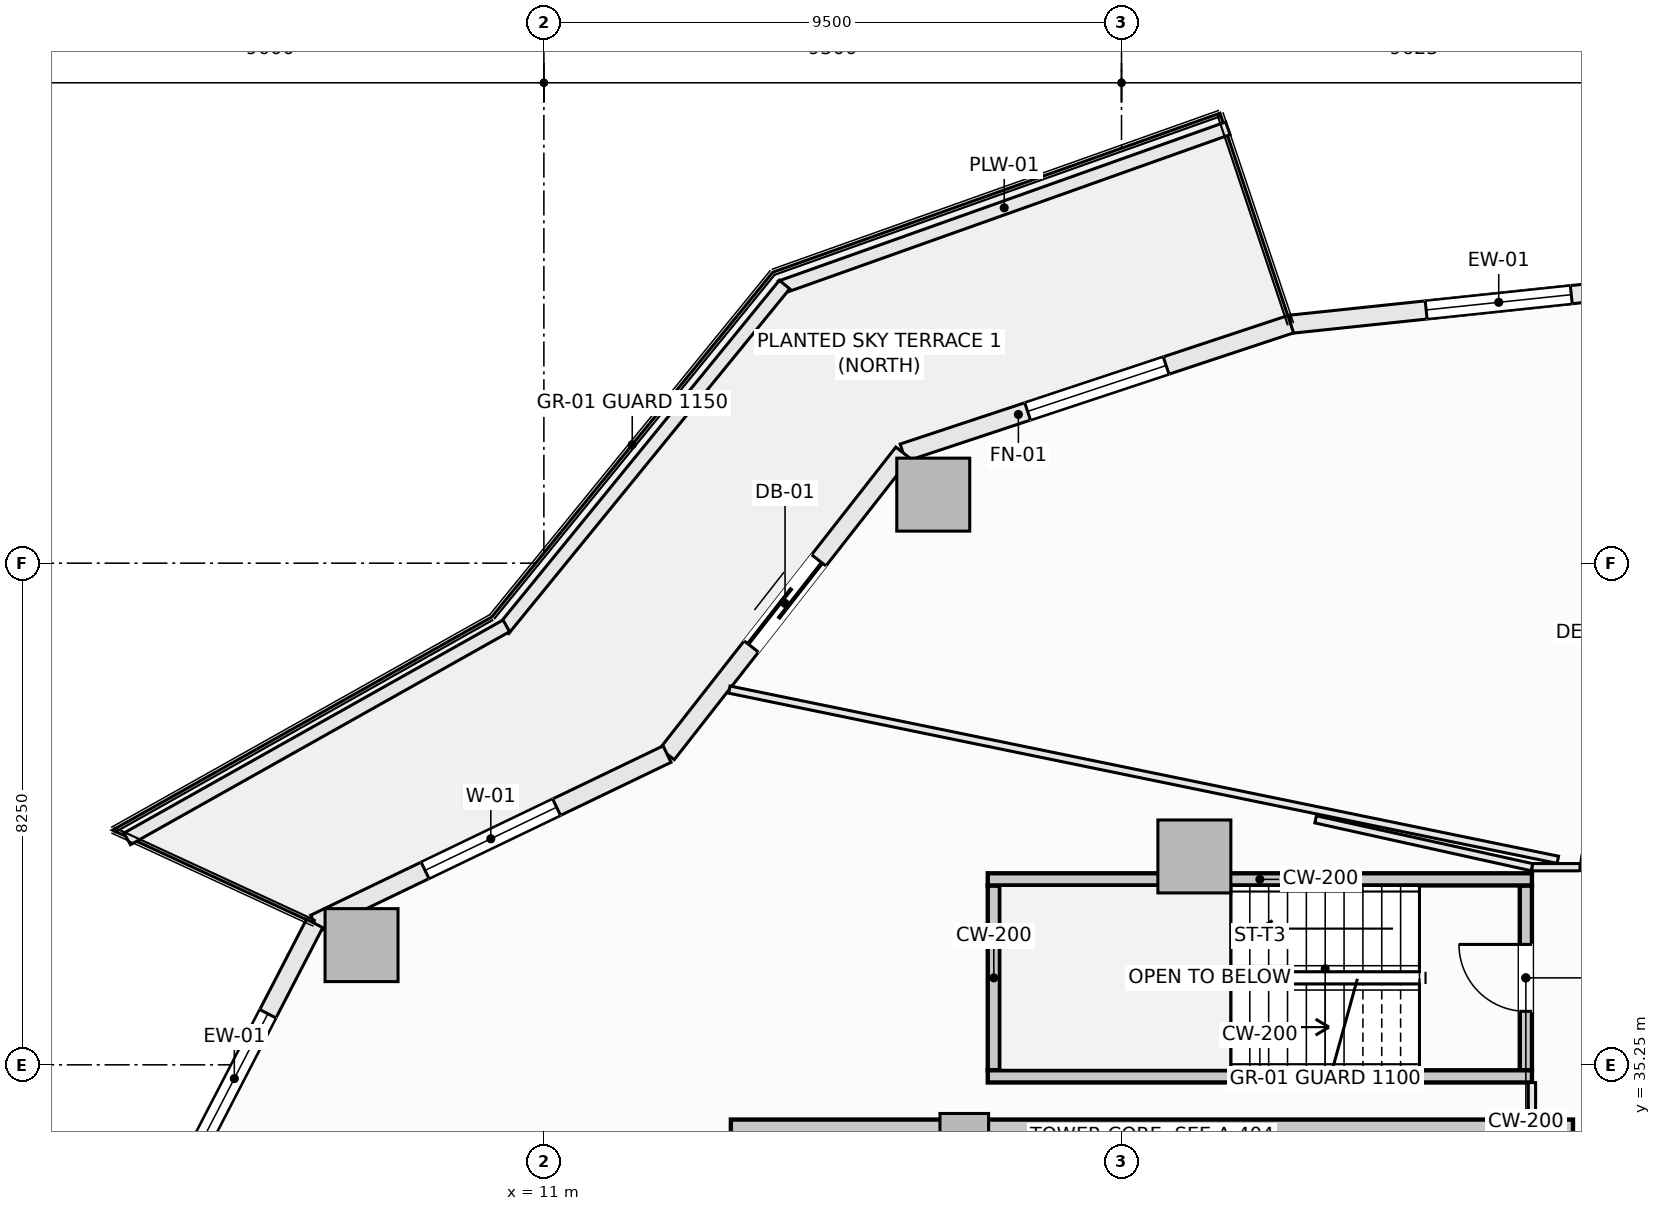
"""IFC4 building model, lengths in metres.
Left out: names, types, materials, properties, quantities, classifications, styles, units other than length and angle.
Written with IfcOpenShell. Run it as: python <this file> out.ifc"""

import sys

from ifc_helpers import new_model, si_unit, direction, frame, frame_2d, origin, origin_2d, place, context, subcontext, project, spatial, rectangle, extrude, element, fill, save


model = new_model("IFC4")
c1 = context("Model", 3, precision=1e-05, world=origin(), true_north=direction((0.0, 1.0)))
c2 = subcontext(c1, "Body", "Model", "MODEL_VIEW")
j1 = project(units=[si_unit("LENGTHUNIT", "METRE"), si_unit("PLANEANGLEUNIT", "RADIAN")], contexts=[c1])
p1 = place(None, origin())
s1 = spatial("IfcSite", under=j1, at=p1, CompositionType="ELEMENT")
p2 = place(p1, origin())
s2 = spatial("IfcBuilding", under=s1, at=p2, CompositionType="ELEMENT")
p3 = place(p2, frame((0.0, 0.0, 61.15)))
s3 = spatial("IfcBuildingStorey", under=s2, at=p3, CompositionType="ELEMENT", Elevation=61.15)
p4 = place(p3, frame((14.075, 33.925, -0.28), z_axis=(0.0, 0.0, 1.0), x_axis=(1.0, 0.0, 0.0)))
e1 = element("IfcWall", 1, at=p4, inside=s3, PredefinedType="SHEAR", context=c2, shape_type="SweptSolid", body=[
    extrude(rectangle(XDim=13.85, YDim=0.85, at=frame_2d((6.925, 0.0))), origin(), (0.0, 0.0, 1.0), 3.85),
])
for number, where, z_axis, x_axis in (
    (2, (17.404, 44.627, -0.28), (0.0, 0.0, 1.0), (1.0, 0.0, 0.0)),
    (3, (8.001, 37.219, -0.28), (0.0, 0.0, 1.0), (1.0, 0.0, 0.0)),
    (4, (21.698, 38.677, -0.28), (0.0, 0.0, 1.0), (1.0, 0.0, 0.0)),
):
    element("IfcColumn", number, at=place(p3, frame(where, z_axis=z_axis, x_axis=x_axis)), inside=s3, PredefinedType="COLUMN", context=c2, shape_type="SweptSolid", body=[
        extrude(rectangle(XDim=1.2, YDim=1.2, at=origin_2d()), origin(), (0.0, 0.0, 1.0), 3.85),
    ])
p5 = place(p3, frame((17.914, 34.05, -0.28), z_axis=(0.0, 0.0, 1.0), x_axis=(1.0, 0.0, 0.0)))
e5 = element("IfcColumn", 5, at=p5, inside=s3, PredefinedType="PILASTER", context=c2, shape_type="SweptSolid", body=[
    extrude(rectangle(XDim=0.8, YDim=0.8, at=origin_2d()), origin(), (0.0, 0.0, 1.0), 3.85),
])
p6 = place(p3, frame((23.282, 47.429, 0.0), z_axis=(0.0, 0.0, 1.0), x_axis=(0.994498840295, 0.104747585419, 0.0)))
e6 = element("IfcWall", 6, at=p6, inside=s3, PredefinedType="SOLIDWALL", context=c2, shape_type="SweptSolid", body=[
    extrude(rectangle(XDim=6.88, YDim=0.3, at=frame_2d((3.44, 0.0))), origin(), (0.0, 0.0, 1.0), 3.093),
])
p7 = place(p6, frame((2.24, 0.0, 0.85)))
e7 = element("IfcOpeningElement", 7, at=p7, cuts=e6, PredefinedType="OPENING", context=c2, shape_type="SweptSolid", body=[
    extrude(rectangle(XDim=2.4, YDim=1.9, at=frame_2d((1.2, 0.95))), frame((0.0, 0.16, 0.0), z_axis=(0.0, -1.0, 0.0), x_axis=(1.0, 0.0, 0.0)), (0.0, 0.0, 1.0), 0.32),
])
p8 = place(p3, frame((16.906, 45.316, 0.0), z_axis=(0.0, 0.0, 1.0), x_axis=(0.949245153629, 0.314537181127, 0.0)))
e8 = element("IfcWall", 8, at=p8, inside=s3, PredefinedType="SOLIDWALL", context=c2, shape_type="SweptSolid", body=[
    extrude(rectangle(XDim=6.717, YDim=0.3, at=frame_2d((3.358, 0.0))), origin(), (0.0, 0.0, 1.0), 3.093),
])
p9 = place(p8, frame((2.159, 0.0, 0.85)))
e9 = element("IfcOpeningElement", 9, at=p9, cuts=e8, PredefinedType="OPENING", context=c2, shape_type="SweptSolid", body=[
    extrude(rectangle(XDim=2.4, YDim=1.9, at=frame_2d((1.2, 0.95))), frame((0.0, 0.16, 0.0), z_axis=(0.0, -1.0, 0.0), x_axis=(1.0, 0.0, 0.0)), (0.0, 0.0, 1.0), 0.32),
])
p10 = place(p3, frame((13.026, 40.36, 0.0), z_axis=(0.0, 0.0, 1.0), x_axis=(0.616434798832, 0.78740595552, 0.0)))
e10 = element("IfcWall", 10, at=p10, inside=s3, PredefinedType="SOLIDWALL", context=c2, shape_type="SweptSolid", body=[
    extrude(rectangle(XDim=6.294, YDim=0.3, at=frame_2d((3.147, 0.0))), origin(), (0.0, 0.0, 1.0), 3.093),
])
p11 = place(p10, frame((2.247, 0.0, 0.0)))
e11 = element("IfcOpeningElement", 11, at=p11, cuts=e10, PredefinedType="OPENING", context=c2, shape_type="SweptSolid", body=[
    extrude(rectangle(XDim=1.8, YDim=2.25, at=frame_2d((0.9, 1.125))), frame((0.0, 0.16, 0.0), z_axis=(0.0, -1.0, 0.0), x_axis=(1.0, 0.0, 0.0)), (0.0, 0.0, 1.0), 0.32),
])
p12 = place(p3, frame((7.229, 37.575, 0.0), z_axis=(0.0, 0.0, 1.0), x_axis=(0.901354747727, 0.433081538224, 0.0)))
e12 = element("IfcWall", 12, at=p12, inside=s3, PredefinedType="SOLIDWALL", context=c2, shape_type="SweptSolid", body=[
    extrude(rectangle(XDim=6.431, YDim=0.3, at=frame_2d((3.215, 0.0))), origin(), (0.0, 0.0, 1.0), 3.093),
])
p13 = place(p12, frame((2.015, 0.0, 0.85)))
e13 = element("IfcOpeningElement", 13, at=p13, cuts=e12, PredefinedType="OPENING", context=c2, shape_type="SweptSolid", body=[
    extrude(rectangle(XDim=2.4, YDim=1.9, at=frame_2d((1.2, 0.95))), frame((0.0, 0.16, 0.0), z_axis=(0.0, -1.0, 0.0), x_axis=(1.0, 0.0, 0.0)), (0.0, 0.0, 1.0), 0.32),
])
p14 = place(p3, frame((4.588, 32.474, 0.0), z_axis=(0.0, 0.0, 1.0), x_axis=(0.459800981414, 0.888021991558, 0.0)))
e14 = element("IfcWall", 14, at=p14, inside=s3, PredefinedType="SOLIDWALL", context=c2, shape_type="SweptSolid", body=[
    extrude(rectangle(XDim=5.744, YDim=0.3, at=frame_2d((2.872, 0.0))), origin(), (0.0, 0.0, 1.0), 3.093),
])
p15 = place(p14, frame((1.672, 0.0, 0.85)))
e15 = element("IfcOpeningElement", 15, at=p15, cuts=e14, PredefinedType="OPENING", context=c2, shape_type="SweptSolid", body=[
    extrude(rectangle(XDim=2.4, YDim=1.9, at=frame_2d((1.2, 0.95))), frame((0.0, 0.16, 0.0), z_axis=(0.0, -1.0, 0.0), x_axis=(1.0, 0.0, 0.0)), (0.0, 0.0, 1.0), 0.32),
])
p16 = place(p3, frame((14.893, 48.035, 0.0), z_axis=(0.0, 0.0, 1.0), x_axis=(0.942200211781, 0.335050385643, 0.0)))
e16 = element("IfcWall", 16, at=p16, inside=s3, PredefinedType="PARAPET", context=c2, shape_type="SweptSolid", body=[
    extrude(rectangle(XDim=7.807, YDim=0.22, at=frame_2d((3.903, 0.0))), origin(), (0.0, 0.0, 1.0), 0.52),
])
p17 = place(p3, frame((10.336, 42.411, 0.0), z_axis=(0.0, 0.0, 1.0), x_axis=(0.631819273026, 0.775115737315, 0.0)))
e17 = element("IfcWall", 17, at=p17, inside=s3, PredefinedType="PARAPET", context=c2, shape_type="SweptSolid", body=[
    extrude(rectangle(XDim=7.316, YDim=0.22, at=frame_2d((3.658, 0.0))), origin(), (0.0, 0.0, 1.0), 0.52),
])
p18 = place(p3, frame((4.147, 38.966, 0.0), z_axis=(0.0, 0.0, 1.0), x_axis=(0.871775109335, 0.489906275468, 0.0)))
e18 = element("IfcWall", 18, at=p18, inside=s3, PredefinedType="PARAPET", context=c2, shape_type="SweptSolid", body=[
    extrude(rectangle(XDim=7.152, YDim=0.22, at=frame_2d((3.576, 0.0))), origin(), (0.0, 0.0, 1.0), 0.52),
])
p19 = place(p3, frame((27.15, 35.16, -0.28), z_axis=(0.0, 0.0, 1.0), x_axis=(0.0, 1.0, 0.0)))
e19 = element("IfcWall", 19, at=p19, inside=s3, PredefinedType="SHEAR", context=c2, shape_type="SweptSolid", body=[
    extrude(rectangle(XDim=3.04, YDim=0.2, at=frame_2d((1.52, 0.0))), origin(), (0.0, 0.0, 1.0), 3.85),
])
p20 = place(p19, frame((0.97, 0.0, 0.28)))
e20 = element("IfcOpeningElement", 20, at=p20, cuts=e19, PredefinedType="OPENING", context=c2, shape_type="SweptSolid", body=[
    extrude(rectangle(XDim=1.1, YDim=2.15, at=frame_2d((0.55, 1.075))), frame((0.0, 0.11, 0.0), z_axis=(0.0, -1.0, 0.0), x_axis=(1.0, 0.0, 0.0)), (0.0, 0.0, 1.0), 0.22),
])
p21 = place(p3, frame((18.4, 35.16, -0.28), z_axis=(0.0, 0.0, 1.0), x_axis=(0.0, 1.0, 0.0)))
e21 = element("IfcWall", 21, at=p21, inside=s3, PredefinedType="SHEAR", context=c2, shape_type="SweptSolid", body=[
    extrude(rectangle(XDim=3.04, YDim=0.2, at=frame_2d((1.52, 0.0))), origin(), (0.0, 0.0, 1.0), 3.85),
])
for number, where, z_axis, x_axis in (
    (22, (18.3, 38.3, -0.28), (0.0, 0.0, 1.0), (1.0, 0.0, 0.0)),
    (23, (18.3, 35.06, -0.28), (0.0, 0.0, 1.0), (1.0, 0.0, 0.0)),
):
    element("IfcWall", number, at=place(p3, frame(where, z_axis=z_axis, x_axis=x_axis)), inside=s3, PredefinedType="SHEAR", context=c2, shape_type="SweptSolid", body=[
        extrude(rectangle(XDim=8.95, YDim=0.2, at=frame_2d((4.475, 0.0))), origin(), (0.0, 0.0, 1.0), 3.85),
    ])
p22 = place(p3, frame((27.25, 34.352, 0.0), z_axis=(0.0, 0.0, 1.0), x_axis=(0.0, 1.0, 0.0)))
e24 = element("IfcWall", 24, at=p22, inside=s3, PredefinedType="PARTITIONING", context=c2, shape_type="SweptSolid", body=[
    extrude(rectangle(XDim=0.606, YDim=0.12, at=frame_2d((0.303, 0.0))), origin(), (0.0, 0.0, 1.0), 3.57),
])
p23 = place(p3, frame((27.25, 38.5, 0.0), z_axis=(0.0, 0.0, 1.0), x_axis=(1.0, 0.0, 0.0)))
e25 = element("IfcWall", 25, at=p23, inside=s3, PredefinedType="PARTITIONING", context=c2, shape_type="SweptSolid", body=[
    extrude(rectangle(XDim=2.53, YDim=0.12, at=frame_2d((1.265, 0.0))), origin(), (0.0, 0.0, 1.0), 3.57),
])
p24 = place(p23, frame((0.79, 0.0, 0.0)))
e26 = element("IfcOpeningElement", 26, at=p24, cuts=e25, PredefinedType="OPENING", context=c2, shape_type="SweptSolid", body=[
    extrude(rectangle(XDim=0.95, YDim=2.1, at=frame_2d((0.475, 1.05))), frame((0.0, 0.07, 0.0), z_axis=(0.0, -1.0, 0.0), x_axis=(1.0, 0.0, 0.0)), (0.0, 0.0, 1.0), 0.14),
])
p25 = place(p3, frame((14.05, 41.421, 0.0), z_axis=(0.0, 0.0, 1.0), x_axis=(0.979545345603, -0.201223547102, 0.0)))
e27 = element("IfcWall", 27, at=p25, inside=s3, PredefinedType="PARTITIONING", context=c2, shape_type="SweptSolid", body=[
    extrude(rectangle(XDim=13.91, YDim=0.12, at=frame_2d((6.955, 0.0))), origin(), (0.0, 0.0, 1.0), 2.934),
])
p26 = place(p3, frame((23.693, 39.287, 0.0), z_axis=(0.0, 0.0, 1.0), x_axis=(0.976382184517, -0.216050525936, 0.0)))
e28 = element("IfcWall", 28, at=p26, inside=s3, PredefinedType="PARTITIONING", context=c2, shape_type="SweptSolid", body=[
    extrude(rectangle(XDim=3.643, YDim=0.12, at=frame_2d((1.822, 0.0))), origin(), (0.0, 0.0, 1.0), 2.934),
])
p27 = place(p7, origin())
e29 = element("IfcWindow", 29, at=p27, inside=s3, PartitioningType="SINGLE_PANEL", PredefinedType="WINDOW", context=c2, shape_type="SweptSolid", body=[
    extrude(rectangle(XDim=2.4, YDim=1.9, at=frame_2d((1.2, 0.95))), frame((0.0, 0.03, 0.0), z_axis=(0.0, -1.0, 0.0), x_axis=(1.0, 0.0, 0.0)), (0.0, 0.0, 1.0), 0.06),
])
fill(e7, e29)
p28 = place(p9, origin())
e30 = element("IfcWindow", 30, at=p28, inside=s3, PartitioningType="SINGLE_PANEL", PredefinedType="WINDOW", context=c2, shape_type="SweptSolid", body=[
    extrude(rectangle(XDim=2.4, YDim=1.9, at=frame_2d((1.2, 0.95))), frame((0.0, 0.03, 0.0), z_axis=(0.0, -1.0, 0.0), x_axis=(1.0, 0.0, 0.0)), (0.0, 0.0, 1.0), 0.06),
])
fill(e9, e30)
p29 = place(p11, origin())
e31 = element("IfcDoor", 31, at=p29, inside=s3, OperationType="SLIDING_TO_LEFT", PredefinedType="DOOR", context=c2, shape_type="SweptSolid", body=[
    extrude(rectangle(XDim=1.8, YDim=2.25, at=frame_2d((0.9, 1.125))), frame((0.0, 0.025, 0.0), z_axis=(0.0, -1.0, 0.0), x_axis=(1.0, 0.0, 0.0)), (0.0, 0.0, 1.0), 0.05),
])
fill(e11, e31)
p30 = place(p13, origin())
e32 = element("IfcWindow", 32, at=p30, inside=s3, PartitioningType="SINGLE_PANEL", PredefinedType="WINDOW", context=c2, shape_type="SweptSolid", body=[
    extrude(rectangle(XDim=2.4, YDim=1.9, at=frame_2d((1.2, 0.95))), frame((0.0, 0.03, 0.0), z_axis=(0.0, -1.0, 0.0), x_axis=(1.0, 0.0, 0.0)), (0.0, 0.0, 1.0), 0.06),
])
fill(e13, e32)
p31 = place(p15, origin())
e33 = element("IfcWindow", 33, at=p31, inside=s3, PartitioningType="SINGLE_PANEL", PredefinedType="WINDOW", context=c2, shape_type="SweptSolid", body=[
    extrude(rectangle(XDim=2.4, YDim=1.9, at=frame_2d((1.2, 0.95))), frame((0.0, 0.03, 0.0), z_axis=(0.0, -1.0, 0.0), x_axis=(1.0, 0.0, 0.0)), (0.0, 0.0, 1.0), 0.06),
])
fill(e15, e33)
p32 = place(p20, origin())
e34 = element("IfcDoor", 34, at=p32, inside=s3, OperationType="SINGLE_SWING_RIGHT", PredefinedType="DOOR", context=c2, shape_type="SweptSolid", body=[
    extrude(rectangle(XDim=1.1, YDim=2.15, at=frame_2d((0.55, 1.075))), frame((0.0, 0.025, 0.0), z_axis=(0.0, -1.0, 0.0), x_axis=(1.0, 0.0, 0.0)), (0.0, 0.0, 1.0), 0.05),
])
fill(e20, e34)
p33 = place(p24, origin())
e35 = element("IfcDoor", 35, at=p33, inside=s3, OperationType="SINGLE_SWING_RIGHT", PredefinedType="DOOR", context=c2, shape_type="SweptSolid", body=[
    extrude(rectangle(XDim=0.95, YDim=2.1, at=frame_2d((0.475, 1.05))), frame((0.0, 0.025, 0.0), z_axis=(0.0, -1.0, 0.0), x_axis=(1.0, 0.0, 0.0)), (0.0, 0.0, 1.0), 0.05),
])
fill(e26, e35)
save(model, sys.argv[1])
